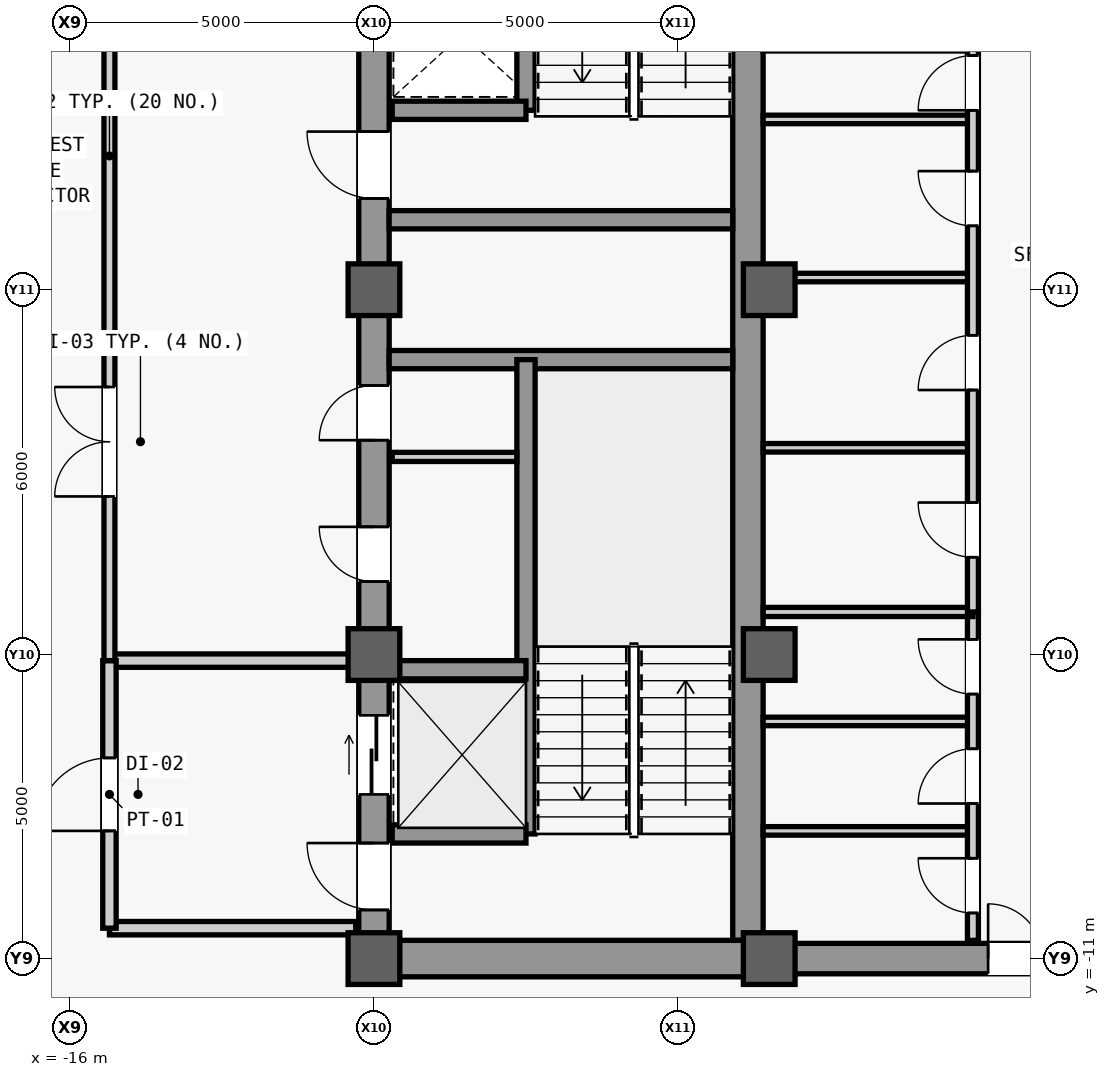
"""IFC4 building model, lengths in metres.
Left out: names, types, materials, properties, quantities, classifications, styles, units other than length and angle.
Written with IfcOpenShell. Run it as: python <this file> out.ifc"""

import sys

from ifc_helpers import new_model, si_unit, direction, frame, frame_2d, origin, origin_2d, place, context, subcontext, project, spatial, rectangle, extrude, source, transform, mapped, element, fill, save


model = new_model("IFC4")
c1 = context("Model", 3, precision=1e-05, world=origin(), true_north=direction((0.0, 1.0)))
c2 = subcontext(c1, "Body", "Model", "MODEL_VIEW")
j1 = project(units=[si_unit("LENGTHUNIT", "METRE"), si_unit("PLANEANGLEUNIT", "RADIAN")], contexts=[c1])
p1 = place(None, origin())
s1 = spatial("IfcSite", under=j1, at=p1, CompositionType="ELEMENT")
p2 = place(p1, origin())
s2 = spatial("IfcBuilding", under=s1, at=p2, CompositionType="ELEMENT")
p3 = place(p2, frame((0.0, 0.0, 235.1)))
s3 = spatial("IfcBuildingStorey", under=s2, at=p3, CompositionType="ELEMENT", Elevation=235.1)
m1 = source(origin(), c2, "Body", "SweptSolid", [
    extrude(rectangle(XDim=22.0, YDim=0.5, at=frame_2d((11.0, 0.0))), origin(), (0.0, 0.0, 1.0), 3.78),
])
p4 = place(p3, frame((-11.0, -11.0, 0.0), z_axis=(0.0, 0.0, 1.0), x_axis=(0.0, 1.0, 0.0)))
e1 = element("IfcWall", 1, at=p4, inside=s3, PredefinedType="SHEAR", context=c2, shape_type="MappedRepresentation", body=[
    mapped(m1, transform((0.0, 0.0, 0.0), scale=1.0)),
])
m2 = source(origin(), c2, "Body", "SweptSolid", [
    extrude(rectangle(XDim=1.1, YDim=2.2, at=frame_2d((0.55, 1.1))), frame((0.0, 0.26, 0.0), z_axis=(0.0, -1.0, 0.0), x_axis=(1.0, 0.0, 0.0)), (0.0, 0.0, 1.0), 0.52),
])
p5 = place(p4, frame((0.8, 0.0, 0.0)))
e2 = element("IfcOpeningElement", 2, at=p5, cuts=e1, PredefinedType="OPENING", context=c2, shape_type="MappedRepresentation", body=[
    mapped(m2, transform((0.0, 0.0, 0.0), scale=1.0)),
])
p6 = place(p4, frame((12.5, 0.0, 0.0)))
e3 = element("IfcOpeningElement", 3, at=p6, cuts=e1, PredefinedType="OPENING", context=c2, shape_type="MappedRepresentation", body=[
    mapped(m2, transform((0.0, 0.0, 0.0), scale=1.0)),
])
m3 = source(origin(), c2, "Body", "SweptSolid", [
    extrude(rectangle(XDim=0.9, YDim=2.15, at=frame_2d((0.45, 1.075))), frame((0.0, 0.26, 0.0), z_axis=(0.0, -1.0, 0.0), x_axis=(1.0, 0.0, 0.0)), (0.0, 0.0, 1.0), 0.52),
])
p7 = place(p4, frame((6.2, 0.0, 0.0)))
e4 = element("IfcOpeningElement", 4, at=p7, cuts=e1, PredefinedType="OPENING", context=c2, shape_type="MappedRepresentation", body=[
    mapped(m3, transform((0.0, 0.0, 0.0), scale=1.0)),
])
p8 = place(p4, frame((8.525, 0.0, 0.0)))
e5 = element("IfcOpeningElement", 5, at=p8, cuts=e1, PredefinedType="OPENING", context=c2, shape_type="MappedRepresentation", body=[
    mapped(m3, transform((0.0, 0.0, 0.0), scale=1.0)),
])
m4 = source(origin(), c2, "Body", "SweptSolid", [
    extrude(rectangle(XDim=1.3, YDim=2.3, at=frame_2d((0.65, 1.15))), frame((0.0, 0.26, 0.0), z_axis=(0.0, -1.0, 0.0), x_axis=(1.0, 0.0, 0.0)), (0.0, 0.0, 1.0), 0.52),
])
p9 = place(p4, frame((2.7, 0.0, 0.0)))
e6 = element("IfcOpeningElement", 6, at=p9, cuts=e1, PredefinedType="OPENING", context=c2, shape_type="MappedRepresentation", body=[
    mapped(m4, transform((0.0, 0.0, 0.0), scale=1.0)),
])
m5 = source(origin(), c2, "Body", "SweptSolid", [
    extrude(rectangle(XDim=21.4, YDim=0.5, at=frame_2d((10.7, 0.0))), origin(), (0.0, 0.0, 1.0), 3.78),
])
p10 = place(p3, frame((-4.85, -10.7, 0.0), z_axis=(0.0, 0.0, 1.0), x_axis=(0.0, 1.0, 0.0)))
e7 = element("IfcWall", 7, at=p10, inside=s3, PredefinedType="SHEAR", context=c2, shape_type="MappedRepresentation", body=[
    mapped(m5, transform((0.0, 0.0, 0.0), scale=1.0)),
])
m6 = source(origin(), c2, "Body", "SweptSolid", [
    extrude(rectangle(XDim=5.9, YDim=0.6, at=frame_2d((2.95, 0.0))), origin(), (0.0, 0.0, 1.0), 3.78),
])
p11 = place(p3, frame((-10.75, -11.0, 0.0), z_axis=(0.0, 0.0, 1.0), x_axis=(1.0, 0.0, 0.0)))
e8 = element("IfcWall", 8, at=p11, inside=s3, PredefinedType="SHEAR", context=c2, shape_type="MappedRepresentation", body=[
    mapped(m6, transform((0.0, 0.0, 0.0), scale=1.0)),
])
m7 = source(origin(), c2, "Body", "SweptSolid", [
    extrude(rectangle(XDim=5.65, YDim=0.3, at=frame_2d((2.825, 0.0))), origin(), (0.0, 0.0, 1.0), 3.78),
])
for number, where, z_axis, x_axis in (
    (9, (-10.75, -1.15, 0.0), (0.0, 0.0, 1.0), (1.0, 0.0, 0.0)),
    (10, (-10.75, 1.15, 0.0), (0.0, 0.0, 1.0), (1.0, 0.0, 0.0)),
):
    element("IfcWall", number, at=place(p3, frame(where, z_axis=z_axis, x_axis=x_axis)), inside=s3, PredefinedType="SHEAR", context=c2, shape_type="MappedRepresentation", body=[
        mapped(m7, transform((0.0, 0.0, 0.0), scale=1.0)),
    ])
m8 = source(origin(), c2, "Body", "SweptSolid", [
    extrude(rectangle(XDim=9.2, YDim=0.5, at=frame_2d((4.6, 0.0))), origin(), (0.0, 0.0, 1.0), 3.78),
])
p12 = place(p3, frame((-4.6, -11.0, 0.0), z_axis=(0.0, 0.0, 1.0), x_axis=(1.0, 0.0, 0.0)))
e11 = element("IfcWall", 11, at=p12, inside=s3, PredefinedType="SHEAR", context=c2, shape_type="MappedRepresentation", body=[
    mapped(m8, transform((0.0, 0.0, 0.0), scale=1.0)),
])
m9 = source(origin(), c2, "Body", "SweptSolid", [
    extrude(rectangle(XDim=1.8, YDim=2.25, at=frame_2d((0.9, 1.125))), frame((0.0, 0.26, 0.0), z_axis=(0.0, -1.0, 0.0), x_axis=(1.0, 0.0, 0.0)), (0.0, 0.0, 1.0), 0.52),
])
p13 = place(p12, frame((3.7, 0.0, 0.0)))
e12 = element("IfcOpeningElement", 12, at=p13, cuts=e11, PredefinedType="OPENING", context=c2, shape_type="MappedRepresentation", body=[
    mapped(m9, transform((0.0, 0.0, 0.0), scale=1.0)),
])
m10 = source(origin(), c2, "Body", "SweptSolid", [
    extrude(rectangle(XDim=0.85, YDim=0.85, at=origin_2d()), origin(), (0.0, 0.0, 1.0), 4.0),
])
for number, where, z_axis, x_axis in (
    (13, (-11.0, -11.0, 0.0), (0.0, 0.0, 1.0), (1.0, 0.0, 0.0)),
    (14, (-11.0, -6.0, 0.0), (0.0, 0.0, 1.0), (1.0, 0.0, 0.0)),
    (15, (-11.0, 0.0, 0.0), (0.0, 0.0, 1.0), (1.0, 0.0, 0.0)),
    (16, (-4.5, -11.0, 0.0), (0.0, 0.0, 1.0), (1.0, 0.0, 0.0)),
    (17, (-4.5, -6.0, 0.0), (0.0, 0.0, 1.0), (1.0, 0.0, 0.0)),
    (18, (-4.5, 0.0, 0.0), (0.0, 0.0, 1.0), (1.0, 0.0, 0.0)),
):
    element("IfcColumn", number, at=place(p3, frame(where, z_axis=z_axis, x_axis=x_axis)), inside=s3, PredefinedType="COLUMN", context=c2, shape_type="MappedRepresentation", body=[
        mapped(m10, transform((0.0, 0.0, 0.0), scale=1.0)),
    ])
m11 = source(origin(), c2, "Body", "SweptSolid", [
    extrude(rectangle(XDim=7.8, YDim=0.3, at=frame_2d((3.9, 0.0))), origin(), (0.0, 0.0, 1.0), 3.78),
])
p14 = place(p3, frame((-8.5, -8.95, 0.0), z_axis=(0.0, 0.0, 1.0), x_axis=(0.0, 1.0, 0.0)))
e19 = element("IfcWall", 19, at=p14, inside=s3, PredefinedType="SHEAR", context=c2, shape_type="MappedRepresentation", body=[
    mapped(m11, transform((0.0, 0.0, 0.0), scale=1.0)),
])
m12 = source(origin(), c2, "Body", "SweptSolid", [
    extrude(rectangle(XDim=2.2, YDim=0.3, at=frame_2d((1.1, 0.0))), origin(), (0.0, 0.0, 1.0), 3.78),
])
for number, where, z_axis, x_axis in (
    (20, (-10.7, -8.95, 0.0), (0.0, 0.0, 1.0), (1.0, 0.0, 0.0)),
    (21, (-10.7, -6.25, 0.0), (0.0, 0.0, 1.0), (1.0, 0.0, 0.0)),
):
    element("IfcWall", number, at=place(p3, frame(where, z_axis=z_axis, x_axis=x_axis)), inside=s3, PredefinedType="SHEAR", context=c2, shape_type="MappedRepresentation", body=[
        mapped(m12, transform((0.0, 0.0, 0.0), scale=1.0)),
    ])
m13 = source(origin(), c2, "Body", "SweptSolid", [
    extrude(rectangle(XDim=7.75, YDim=0.3, at=frame_2d((3.875, 0.0))), origin(), (0.0, 0.0, 1.0), 3.78),
])
p15 = place(p3, frame((-8.5, 2.95, 0.0), z_axis=(0.0, 0.0, 1.0), x_axis=(0.0, 1.0, 0.0)))
e22 = element("IfcWall", 22, at=p15, inside=s3, PredefinedType="SHEAR", context=c2, shape_type="MappedRepresentation", body=[
    mapped(m13, transform((0.0, 0.0, 0.0), scale=1.0)),
])
p16 = place(p3, frame((-10.7, 2.95, 0.0), z_axis=(0.0, 0.0, 1.0), x_axis=(1.0, 0.0, 0.0)))
e23 = element("IfcWall", 23, at=p16, inside=s3, PredefinedType="SHEAR", context=c2, shape_type="MappedRepresentation", body=[
    mapped(m12, transform((0.0, 0.0, 0.0), scale=1.0)),
])
m14 = source(origin(), c2, "Body", "SweptSolid", [
    extrude(rectangle(XDim=2.05, YDim=0.15, at=frame_2d((1.025, 0.0))), origin(), (0.0, 0.0, 1.0), 3.78),
])
p17 = place(p3, frame((-10.7, -2.75, 0.0), z_axis=(0.0, 0.0, 1.0), x_axis=(1.0, 0.0, 0.0)))
e24 = element("IfcWall", 24, at=p17, inside=s3, PredefinedType="PARTITIONING", context=c2, shape_type="MappedRepresentation", body=[
    mapped(m14, transform((0.0, 0.0, 0.0), scale=1.0)),
])
m15 = source(origin(), c2, "Body", "SweptSolid", [
    extrude(rectangle(XDim=4.05, YDim=0.22, at=frame_2d((2.025, 0.0))), origin(), (0.0, 0.0, 1.0), 3.78),
])
p18 = place(p3, frame((-15.35, -10.5, 0.0), z_axis=(0.0, 0.0, 1.0), x_axis=(1.0, 0.0, 0.0)))
e25 = element("IfcWall", 25, at=p18, inside=s3, PredefinedType="PARTITIONING", context=c2, shape_type="MappedRepresentation", body=[
    mapped(m15, transform((0.0, 0.0, 0.0), scale=1.0)),
])
m16 = source(origin(), c2, "Body", "SweptSolid", [
    extrude(rectangle(XDim=4.05, YDim=0.22, at=frame_2d((2.025, 0.0))), origin(), (0.0, 0.0, 1.0), 3.085),
])
p19 = place(p3, frame((-15.35, -6.1, 0.0), z_axis=(0.0, 0.0, 1.0), x_axis=(1.0, 0.0, 0.0)))
e26 = element("IfcWall", 26, at=p19, inside=s3, PredefinedType="PARTITIONING", context=c2, shape_type="MappedRepresentation", body=[
    mapped(m16, transform((0.0, 0.0, 0.0), scale=1.0)),
])
m17 = source(origin(), c2, "Body", "SweptSolid", [
    extrude(rectangle(XDim=4.4, YDim=0.22, at=frame_2d((2.2, 0.0))), origin(), (0.0, 0.0, 1.0), 3.78),
])
p20 = place(p3, frame((-15.35, -10.5, 0.0), z_axis=(0.0, 0.0, 1.0), x_axis=(0.0, 1.0, 0.0)))
e27 = element("IfcWall", 27, at=p20, inside=s3, PredefinedType="PARTITIONING", context=c2, shape_type="MappedRepresentation", body=[
    mapped(m17, transform((0.0, 0.0, 0.0), scale=1.0)),
])
m18 = source(origin(), c2, "Body", "SweptSolid", [
    extrude(rectangle(XDim=1.2, YDim=2.2, at=frame_2d((0.6, 1.1))), frame((0.0, 0.12, 0.0), z_axis=(0.0, -1.0, 0.0), x_axis=(1.0, 0.0, 0.0)), (0.0, 0.0, 1.0), 0.24),
])
p21 = place(p20, frame((1.6, 0.0, 0.0)))
e28 = element("IfcOpeningElement", 28, at=p21, cuts=e27, PredefinedType="OPENING", context=c2, shape_type="MappedRepresentation", body=[
    mapped(m18, transform((0.0, 0.0, 0.0), scale=1.0)),
])
m19 = source(origin(), c2, "Body", "SweptSolid", [
    extrude(rectangle(XDim=16.6, YDim=0.18, at=frame_2d((8.3, 0.0))), origin(), (0.0, 0.0, 1.0), 3.78),
])
p22 = place(p3, frame((-15.35, -6.1, 0.0), z_axis=(0.0, 0.0, 1.0), x_axis=(0.0, 1.0, 0.0)))
e29 = element("IfcWall", 29, at=p22, inside=s3, PredefinedType="PARTITIONING", context=c2, shape_type="MappedRepresentation", body=[
    mapped(m19, transform((0.0, 0.0, 0.0), scale=1.0)),
])
m20 = source(origin(), c2, "Body", "SweptSolid", [
    extrude(rectangle(XDim=1.8, YDim=2.25, at=frame_2d((0.9, 1.125))), frame((0.0, 0.1, 0.0), z_axis=(0.0, -1.0, 0.0), x_axis=(1.0, 0.0, 0.0)), (0.0, 0.0, 1.0), 0.2),
])
p23 = place(p22, frame((2.7, 0.0, 0.0)))
e30 = element("IfcOpeningElement", 30, at=p23, cuts=e29, PredefinedType="OPENING", context=c2, shape_type="MappedRepresentation", body=[
    mapped(m20, transform((0.0, 0.0, 0.0), scale=1.0)),
])
p24 = place(p22, frame((11.0, 0.0, 0.0)))
e31 = element("IfcOpeningElement", 31, at=p24, cuts=e29, PredefinedType="OPENING", context=c2, shape_type="MappedRepresentation", body=[
    mapped(m20, transform((0.0, 0.0, 0.0), scale=1.0)),
])
m21 = source(origin(), c2, "Body", "SweptSolid", [
    extrude(rectangle(XDim=3.45, YDim=0.14, at=frame_2d((1.725, 0.0))), origin(), (0.0, 0.0, 1.0), 3.78),
])
for number, where, z_axis, x_axis in (
    (32, (-4.6, -8.9, 0.0), (0.0, 0.0, 1.0), (1.0, 0.0, 0.0)),
    (33, (-4.6, -7.1, 0.0), (0.0, 0.0, 1.0), (1.0, 0.0, 0.0)),
):
    element("IfcWall", number, at=place(p3, frame(where, z_axis=z_axis, x_axis=x_axis)), inside=s3, PredefinedType="PARTITIONING", context=c2, shape_type="MappedRepresentation", body=[
        mapped(m21, transform((0.0, 0.0, 0.0), scale=1.0)),
    ])
m22 = source(origin(), c2, "Body", "SweptSolid", [
    extrude(rectangle(XDim=5.4, YDim=0.18, at=frame_2d((2.7, 0.0))), origin(), (0.0, 0.0, 1.0), 3.78),
])
p25 = place(p3, frame((-1.15, -10.7, 0.0), z_axis=(0.0, 0.0, 1.0), x_axis=(0.0, 1.0, 0.0)))
e34 = element("IfcWall", 34, at=p25, inside=s3, PredefinedType="PARTITIONING", context=c2, shape_type="MappedRepresentation", body=[
    mapped(m22, transform((0.0, 0.0, 0.0), scale=1.0)),
])
m23 = source(origin(), c2, "Body", "SweptSolid", [
    extrude(rectangle(XDim=0.9, YDim=2.15, at=frame_2d((0.45, 1.075))), frame((0.0, 0.1, 0.0), z_axis=(0.0, -1.0, 0.0), x_axis=(1.0, 0.0, 0.0)), (0.0, 0.0, 1.0), 0.2),
])
p26 = place(p25, frame((0.45, 0.0, 0.0)))
e35 = element("IfcOpeningElement", 35, at=p26, cuts=e34, PredefinedType="OPENING", context=c2, shape_type="MappedRepresentation", body=[
    mapped(m23, transform((0.0, 0.0, 0.0), scale=1.0)),
])
p27 = place(p25, frame((2.25, 0.0, 0.0)))
e36 = element("IfcOpeningElement", 36, at=p27, cuts=e34, PredefinedType="OPENING", context=c2, shape_type="MappedRepresentation", body=[
    mapped(m23, transform((0.0, 0.0, 0.0), scale=1.0)),
])
p28 = place(p25, frame((4.05, 0.0, 0.0)))
e37 = element("IfcOpeningElement", 37, at=p28, cuts=e34, PredefinedType="OPENING", context=c2, shape_type="MappedRepresentation", body=[
    mapped(m23, transform((0.0, 0.0, 0.0), scale=1.0)),
])
m24 = source(origin(), c2, "Body", "SweptSolid", [
    extrude(rectangle(XDim=3.45, YDim=0.15, at=frame_2d((1.725, 0.0))), origin(), (0.0, 0.0, 1.0), 3.78),
])
p29 = place(p3, frame((-4.6, -5.3, 0.0), z_axis=(0.0, 0.0, 1.0), x_axis=(1.0, 0.0, 0.0)))
e38 = element("IfcWall", 38, at=p29, inside=s3, PredefinedType="PARTITIONING", context=c2, shape_type="MappedRepresentation", body=[
    mapped(m24, transform((0.0, 0.0, 0.0), scale=1.0)),
])
p30 = place(p3, frame((-4.6, -2.6, 0.0), z_axis=(0.0, 0.0, 1.0), x_axis=(1.0, 0.0, 0.0)))
e39 = element("IfcWall", 39, at=p30, inside=s3, PredefinedType="PARTITIONING", context=c2, shape_type="MappedRepresentation", body=[
    mapped(m21, transform((0.0, 0.0, 0.0), scale=1.0)),
])
m25 = source(origin(), c2, "Body", "SweptSolid", [
    extrude(rectangle(XDim=3.45, YDim=0.14, at=frame_2d((1.725, 0.0))), origin(), (0.0, 0.0, 1.0), 3.085),
])
p31 = place(p3, frame((-4.6, 0.2, 0.0), z_axis=(0.0, 0.0, 1.0), x_axis=(1.0, 0.0, 0.0)))
e40 = element("IfcWall", 40, at=p31, inside=s3, PredefinedType="PARTITIONING", context=c2, shape_type="MappedRepresentation", body=[
    mapped(m25, transform((0.0, 0.0, 0.0), scale=1.0)),
])
p32 = place(p3, frame((-4.6, 2.8, 0.0), z_axis=(0.0, 0.0, 1.0), x_axis=(1.0, 0.0, 0.0)))
e41 = element("IfcWall", 41, at=p32, inside=s3, PredefinedType="PARTITIONING", context=c2, shape_type="MappedRepresentation", body=[
    mapped(m21, transform((0.0, 0.0, 0.0), scale=1.0)),
])
m26 = source(origin(), c2, "Body", "SweptSolid", [
    extrude(rectangle(XDim=10.6, YDim=0.18, at=frame_2d((5.3, 0.0))), origin(), (0.0, 0.0, 1.0), 3.78),
])
p33 = place(p3, frame((-1.15, -5.3, 0.0), z_axis=(0.0, 0.0, 1.0), x_axis=(0.0, 1.0, 0.0)))
e42 = element("IfcWall", 42, at=p33, inside=s3, PredefinedType="PARTITIONING", context=c2, shape_type="MappedRepresentation", body=[
    mapped(m26, transform((0.0, 0.0, 0.0), scale=1.0)),
])
p34 = place(p33, frame((0.9, 0.0, 0.0)))
e43 = element("IfcOpeningElement", 43, at=p34, cuts=e42, PredefinedType="OPENING", context=c2, shape_type="MappedRepresentation", body=[
    mapped(m23, transform((0.0, 0.0, 0.0), scale=1.0)),
])
p35 = place(p33, frame((3.65, 0.0, 0.0)))
e44 = element("IfcOpeningElement", 44, at=p35, cuts=e42, PredefinedType="OPENING", context=c2, shape_type="MappedRepresentation", body=[
    mapped(m23, transform((0.0, 0.0, 0.0), scale=1.0)),
])
p36 = place(p33, frame((6.35, 0.0, 0.0)))
e45 = element("IfcOpeningElement", 45, at=p36, cuts=e42, PredefinedType="OPENING", context=c2, shape_type="MappedRepresentation", body=[
    mapped(m23, transform((0.0, 0.0, 0.0), scale=1.0)),
])
p37 = place(p33, frame((8.25, 0.0, 0.0)))
e46 = element("IfcOpeningElement", 46, at=p37, cuts=e42, PredefinedType="OPENING", context=c2, shape_type="MappedRepresentation", body=[
    mapped(m23, transform((0.0, 0.0, 0.0), scale=1.0)),
])
p38 = place(p33, frame((9.475, 0.0, 0.0)))
e47 = element("IfcOpeningElement", 47, at=p38, cuts=e42, PredefinedType="OPENING", context=c2, shape_type="MappedRepresentation", body=[
    mapped(m23, transform((0.0, 0.0, 0.0), scale=1.0)),
])
m27 = source(origin(), c2, "Body", "SweptSolid", [
    extrude(rectangle(XDim=1.1, YDim=2.2, at=frame_2d((0.55, 1.1))), frame((0.0, 0.025, 0.0), z_axis=(0.0, -1.0, 0.0), x_axis=(1.0, 0.0, 0.0)), (0.0, 0.0, 1.0), 0.05),
])
p39 = place(p5, origin())
e48 = element("IfcDoor", 48, at=p39, inside=s3, OperationType="SINGLE_SWING_RIGHT", PredefinedType="DOOR", context=c2, shape_type="MappedRepresentation", body=[
    mapped(m27, transform((0.0, 0.0, 0.0), scale=1.0)),
])
fill(e2, e48)
p40 = place(p6, origin())
e49 = element("IfcDoor", 49, at=p40, inside=s3, OperationType="SINGLE_SWING_RIGHT", PredefinedType="DOOR", context=c2, shape_type="MappedRepresentation", body=[
    mapped(m27, transform((0.0, 0.0, 0.0), scale=1.0)),
])
fill(e3, e49)
m28 = source(origin(), c2, "Body", "SweptSolid", [
    extrude(rectangle(XDim=0.9, YDim=2.15, at=frame_2d((0.45, 1.075))), frame((0.0, 0.025, 0.0), z_axis=(0.0, -1.0, 0.0), x_axis=(1.0, 0.0, 0.0)), (0.0, 0.0, 1.0), 0.05),
])
p41 = place(p7, origin())
e50 = element("IfcDoor", 50, at=p41, inside=s3, OperationType="SINGLE_SWING_RIGHT", PredefinedType="DOOR", context=c2, shape_type="MappedRepresentation", body=[
    mapped(m28, transform((0.0, 0.0, 0.0), scale=1.0)),
])
fill(e4, e50)
p42 = place(p8, origin())
e51 = element("IfcDoor", 51, at=p42, inside=s3, OperationType="SINGLE_SWING_LEFT", PredefinedType="DOOR", context=c2, shape_type="MappedRepresentation", body=[
    mapped(m28, transform((0.0, 0.0, 0.0), scale=1.0)),
])
fill(e5, e51)
m29 = source(origin(), c2, "Body", "SweptSolid", [
    extrude(rectangle(XDim=1.2, YDim=2.2, at=frame_2d((0.6, 1.1))), frame((0.0, 0.025, 0.0), z_axis=(0.0, -1.0, 0.0), x_axis=(1.0, 0.0, 0.0)), (0.0, 0.0, 1.0), 0.05),
])
p43 = place(p21, origin())
e52 = element("IfcDoor", 52, at=p43, inside=s3, OperationType="SINGLE_SWING_LEFT", PredefinedType="DOOR", context=c2, shape_type="MappedRepresentation", body=[
    mapped(m29, transform((0.0, 0.0, 0.0), scale=1.0)),
])
fill(e28, e52)
m30 = source(origin(), c2, "Body", "SweptSolid", [
    extrude(rectangle(XDim=1.8, YDim=2.25, at=frame_2d((0.9, 1.125))), frame((0.0, 0.025, 0.0), z_axis=(0.0, -1.0, 0.0), x_axis=(1.0, 0.0, 0.0)), (0.0, 0.0, 1.0), 0.05),
])
p44 = place(p23, origin())
e53 = element("IfcDoor", 53, at=p44, inside=s3, OperationType="SINGLE_SWING_LEFT", PredefinedType="DOOR", context=c2, shape_type="MappedRepresentation", body=[
    mapped(m30, transform((0.0, 0.0, 0.0), scale=1.0)),
])
fill(e30, e53)
p45 = place(p26, origin())
e54 = element("IfcDoor", 54, at=p45, inside=s3, OperationType="SINGLE_SWING_RIGHT", PredefinedType="DOOR", context=c2, shape_type="MappedRepresentation", body=[
    mapped(m28, transform((0.0, 0.0, 0.0), scale=1.0)),
])
fill(e35, e54)
p46 = place(p27, origin())
e55 = element("IfcDoor", 55, at=p46, inside=s3, OperationType="SINGLE_SWING_LEFT", PredefinedType="DOOR", context=c2, shape_type="MappedRepresentation", body=[
    mapped(m28, transform((0.0, 0.0, 0.0), scale=1.0)),
])
fill(e36, e55)
p47 = place(p28, origin())
e56 = element("IfcDoor", 56, at=p47, inside=s3, OperationType="SINGLE_SWING_RIGHT", PredefinedType="DOOR", context=c2, shape_type="MappedRepresentation", body=[
    mapped(m28, transform((0.0, 0.0, 0.0), scale=1.0)),
])
fill(e37, e56)
p48 = place(p13, origin())
e57 = element("IfcDoor", 57, at=p48, inside=s3, OperationType="SINGLE_SWING_LEFT", PredefinedType="DOOR", context=c2, shape_type="MappedRepresentation", body=[
    mapped(m30, transform((0.0, 0.0, 0.0), scale=1.0)),
])
fill(e12, e57)
p49 = place(p34, origin())
e58 = element("IfcDoor", 58, at=p49, inside=s3, OperationType="SINGLE_SWING_RIGHT", PredefinedType="DOOR", context=c2, shape_type="MappedRepresentation", body=[
    mapped(m28, transform((0.0, 0.0, 0.0), scale=1.0)),
])
fill(e43, e58)
p50 = place(p35, origin())
e59 = element("IfcDoor", 59, at=p50, inside=s3, OperationType="SINGLE_SWING_LEFT", PredefinedType="DOOR", context=c2, shape_type="MappedRepresentation", body=[
    mapped(m28, transform((0.0, 0.0, 0.0), scale=1.0)),
])
fill(e44, e59)
p51 = place(p36, origin())
e60 = element("IfcDoor", 60, at=p51, inside=s3, OperationType="SINGLE_SWING_RIGHT", PredefinedType="DOOR", context=c2, shape_type="MappedRepresentation", body=[
    mapped(m28, transform((0.0, 0.0, 0.0), scale=1.0)),
])
fill(e45, e60)
p52 = place(p37, origin())
e61 = element("IfcDoor", 61, at=p52, inside=s3, OperationType="SINGLE_SWING_LEFT", PredefinedType="DOOR", context=c2, shape_type="MappedRepresentation", body=[
    mapped(m28, transform((0.0, 0.0, 0.0), scale=1.0)),
])
fill(e46, e61)
m31 = source(origin(), c2, "Body", "SweptSolid", [
    extrude(rectangle(XDim=1.3, YDim=2.3, at=frame_2d((0.65, 1.15))), frame((0.0, 0.025, 0.0), z_axis=(0.0, -1.0, 0.0), x_axis=(1.0, 0.0, 0.0)), (0.0, 0.0, 1.0), 0.05),
])
p53 = place(p9, origin())
e62 = element("IfcDoor", 62, at=p53, inside=s3, OperationType="SLIDING_TO_LEFT", PredefinedType="DOOR", context=c2, shape_type="MappedRepresentation", body=[
    mapped(m31, transform((0.0, 0.0, 0.0), scale=1.0)),
])
fill(e6, e62)
save(model, sys.argv[1])
